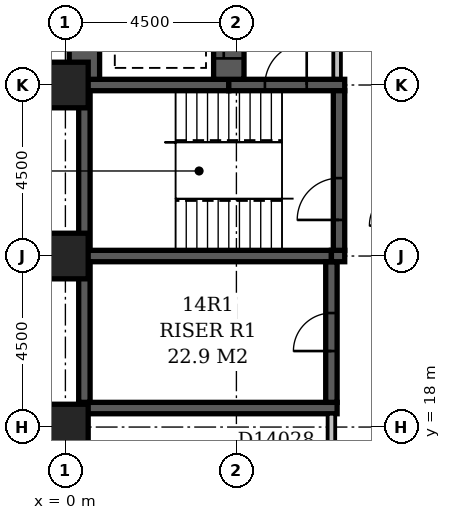
"""IFC4 building model, lengths in metres.
Left out: names, types, materials, properties, quantities, classifications, styles, units other than length and angle.
Written with IfcOpenShell. Run it as: python <this file> out.ifc"""

import sys

from ifc_helpers import new_model, si_unit, direction, frame, frame_2d, origin, origin_2d, place, context, subcontext, project, spatial, rectangle, extrude, element, fill, save


model = new_model("IFC4")
c1 = context("Model", 3, precision=1e-05, world=origin(), true_north=direction((0.0, 1.0)))
c2 = subcontext(c1, "Body", "Model", "MODEL_VIEW")
j1 = project(units=[si_unit("LENGTHUNIT", "METRE"), si_unit("PLANEANGLEUNIT", "RADIAN")], contexts=[c1])
p1 = place(None, origin())
s1 = spatial("IfcSite", under=j1, at=p1, CompositionType="ELEMENT")
p2 = place(p1, origin())
s2 = spatial("IfcBuilding", under=s1, at=p2, CompositionType="ELEMENT")
p3 = place(p2, frame((0.0, 0.0, 61.4)))
s3 = spatial("IfcBuildingStorey", under=s2, at=p3, CompositionType="ELEMENT", Elevation=61.4)
p4 = place(p3, frame((0.35, 18.5, -0.3), z_axis=(0.0, 0.0, 1.0), x_axis=(1.0, 0.0, 0.0)))
e1 = element("IfcWall", 1, at=p4, inside=s3, PredefinedType="SHEAR", context=c2, shape_type="SweptSolid", body=[
    extrude(rectangle(XDim=6.8, YDim=0.3, at=frame_2d((3.4, 0.0))), origin(), (0.0, 0.0, 1.0), 3.6),
])
p5 = place(p3, frame((0.35, 22.5, -0.3), z_axis=(0.0, 0.0, 1.0), x_axis=(1.0, 0.0, 0.0)))
e2 = element("IfcWall", 2, at=p5, inside=s3, PredefinedType="SHEAR", context=c2, shape_type="SweptSolid", body=[
    extrude(rectangle(XDim=6.65, YDim=0.3, at=frame_2d((3.325, 0.0))), origin(), (0.0, 0.0, 1.0), 3.6),
])
p6 = place(p3, frame((0.35, 27.0, -0.3), z_axis=(0.0, 0.0, 1.0), x_axis=(1.0, 0.0, 0.0)))
e3 = element("IfcWall", 3, at=p6, inside=s3, PredefinedType="SHEAR", context=c2, shape_type="SweptSolid", body=[
    extrude(rectangle(XDim=3.95, YDim=0.3, at=frame_2d((1.975, 0.0))), origin(), (0.0, 0.0, 1.0), 3.6),
])
p7 = place(p3, frame((0.5, 18.65, -0.3), z_axis=(0.0, 0.0, 1.0), x_axis=(0.0, 1.0, 0.0)))
e4 = element("IfcWall", 4, at=p7, inside=s3, PredefinedType="SHEAR", context=c2, shape_type="SweptSolid", body=[
    extrude(rectangle(XDim=3.7, YDim=0.3, at=frame_2d((1.85, 0.0))), origin(), (0.0, 0.0, 1.0), 3.6),
])
p8 = place(p3, frame((0.5, 22.65, -0.3), z_axis=(0.0, 0.0, 1.0), x_axis=(0.0, 1.0, 0.0)))
e5 = element("IfcWall", 5, at=p8, inside=s3, PredefinedType="SHEAR", context=c2, shape_type="SweptSolid", body=[
    extrude(rectangle(XDim=4.2, YDim=0.3, at=frame_2d((2.1, 0.0))), origin(), (0.0, 0.0, 1.0), 3.6),
])
p9 = place(p3, frame((0.5, 27.15, -0.3), z_axis=(0.0, 0.0, 1.0), x_axis=(0.0, 1.0, 0.0)))
e6 = element("IfcWall", 6, at=p9, inside=s3, PredefinedType="SHEAR", context=c2, shape_type="SweptSolid", body=[
    extrude(rectangle(XDim=6.95, YDim=0.8, at=frame_2d((3.475, 0.0))), origin(), (0.0, 0.0, 1.0), 3.6),
])
p10 = place(p3, frame((4.3, 27.0, -0.3), z_axis=(0.0, 0.0, 1.0), x_axis=(1.0, 0.0, 0.0)))
e7 = element("IfcWall", 7, at=p10, inside=s3, PredefinedType="SHEAR", context=c2, shape_type="SweptSolid", body=[
    extrude(rectangle(XDim=3.05, YDim=0.3, at=frame_2d((1.525, 0.0))), origin(), (0.0, 0.0, 1.0), 3.6),
])
p11 = place(p10, frame((0.95, 0.0, 0.3)))
e8 = element("IfcOpeningElement", 8, at=p11, cuts=e7, PredefinedType="OPENING", context=c2, shape_type="SweptSolid", body=[
    extrude(rectangle(XDim=1.1, YDim=2.1, at=frame_2d((0.55, 1.05))), frame((0.0, 0.162, 0.0), z_axis=(0.0, -1.0, 0.0), x_axis=(1.0, 0.0, 0.0)), (0.0, 0.0, 1.0), 0.324),
])
p12 = place(p3, frame((4.3, 27.15, -0.3), z_axis=(0.0, 0.0, 1.0), x_axis=(0.0, 1.0, 0.0)))
e9 = element("IfcWall", 9, at=p12, inside=s3, PredefinedType="SHEAR", context=c2, shape_type="SweptSolid", body=[
    extrude(rectangle(XDim=6.95, YDim=0.8, at=frame_2d((3.475, 0.0))), origin(), (0.0, 0.0, 1.0), 3.6),
])
p13 = place(p12, frame((3.05, 0.0, 0.3)))
e10 = element("IfcOpeningElement", 10, at=p13, cuts=e9, PredefinedType="OPENING", context=c2, shape_type="SweptSolid", body=[
    extrude(rectangle(XDim=1.1, YDim=2.1, at=frame_2d((0.55, 1.05))), frame((0.0, 0.412, 0.0), z_axis=(0.0, -1.0, 0.0), x_axis=(1.0, 0.0, 0.0)), (0.0, 0.0, 1.0), 0.824),
])
p14 = place(p12, frame((0.55, 0.0, 0.3)))
e11 = element("IfcOpeningElement", 11, at=p14, cuts=e9, PredefinedType="OPENING", context=c2, shape_type="SweptSolid", body=[
    extrude(rectangle(XDim=1.1, YDim=2.1, at=frame_2d((0.55, 1.05))), frame((0.0, 0.412, 0.0), z_axis=(0.0, -1.0, 0.0), x_axis=(1.0, 0.0, 0.0)), (0.0, 0.0, 1.0), 0.824),
])
p15 = place(p12, frame((5.35, 0.0, 0.3)))
e12 = element("IfcOpeningElement", 12, at=p15, cuts=e9, PredefinedType="OPENING", context=c2, shape_type="SweptSolid", body=[
    extrude(rectangle(XDim=1.1, YDim=2.1, at=frame_2d((0.55, 1.05))), frame((0.0, 0.412, 0.0), z_axis=(0.0, -1.0, 0.0), x_axis=(1.0, 0.0, 0.0)), (0.0, 0.0, 1.0), 0.824),
])
p16 = place(p3, frame((7.0, 18.65, -0.3), z_axis=(0.0, 0.0, 1.0), x_axis=(0.0, 1.0, 0.0)))
e13 = element("IfcWall", 13, at=p16, inside=s3, PredefinedType="SHEAR", context=c2, shape_type="SweptSolid", body=[
    extrude(rectangle(XDim=3.7, YDim=0.3, at=frame_2d((1.85, 0.0))), origin(), (0.0, 0.0, 1.0), 3.6),
])
p17 = place(p16, frame((1.35, 0.0, 0.3)))
e14 = element("IfcOpeningElement", 14, at=p17, cuts=e13, PredefinedType="OPENING", context=c2, shape_type="SweptSolid", body=[
    extrude(rectangle(XDim=1.0, YDim=2.1, at=frame_2d((0.5, 1.05))), frame((0.0, 0.162, 0.0), z_axis=(0.0, -1.0, 0.0), x_axis=(1.0, 0.0, 0.0)), (0.0, 0.0, 1.0), 0.324),
])
p18 = place(p3, frame((7.0, 22.5, -0.3), z_axis=(0.0, 0.0, 1.0), x_axis=(1.0, 0.0, 0.0)))
e15 = element("IfcWall", 15, at=p18, inside=s3, PredefinedType="SHEAR", context=c2, shape_type="SweptSolid", body=[
    extrude(rectangle(XDim=0.35, YDim=0.3, at=frame_2d((0.175, 0.0))), origin(), (0.0, 0.0, 1.0), 3.6),
])
p19 = place(p3, frame((7.2, 22.65, -0.3), z_axis=(0.0, 0.0, 1.0), x_axis=(0.0, 1.0, 0.0)))
e16 = element("IfcWall", 16, at=p19, inside=s3, PredefinedType="SHEAR", context=c2, shape_type="SweptSolid", body=[
    extrude(rectangle(XDim=4.2, YDim=0.3, at=frame_2d((2.1, 0.0))), origin(), (0.0, 0.0, 1.0), 3.6),
])
p20 = place(p19, frame((0.8, 0.0, 0.3)))
e17 = element("IfcOpeningElement", 17, at=p20, cuts=e16, PredefinedType="OPENING", context=c2, shape_type="SweptSolid", body=[
    extrude(rectangle(XDim=1.1, YDim=2.1, at=frame_2d((0.55, 1.05))), frame((0.0, 0.162, 0.0), z_axis=(0.0, -1.0, 0.0), x_axis=(1.0, 0.0, 0.0)), (0.0, 0.0, 1.0), 0.324),
])
for number, where, z_axis, x_axis in (
    (18, (0.0, 18.0, -0.3), (0.0, 0.0, 1.0), (1.0, 0.0, 0.0)),
    (19, (0.0, 22.5, -0.3), (0.0, 0.0, 1.0), (1.0, 0.0, 0.0)),
    (20, (0.0, 27.0, -0.3), (0.0, 0.0, 1.0), (1.0, 0.0, 0.0)),
):
    element("IfcColumn", number, at=place(p3, frame(where, z_axis=z_axis, x_axis=x_axis)), inside=s3, PredefinedType="COLUMN", context=c2, shape_type="SweptSolid", body=[
        extrude(rectangle(XDim=1.2, YDim=1.2, at=origin_2d()), origin(), (0.0, 0.0, 1.0), 3.6),
    ])
p21 = place(p3, frame((7.15, 27.17, 0.0), z_axis=(0.0, 0.0, 1.0), x_axis=(0.0, 1.0, 0.0)))
e21 = element("IfcWall", 21, at=p21, inside=s3, PredefinedType="PARTITIONING", context=c2, shape_type="SweptSolid", body=[
    extrude(rectangle(XDim=4.83, YDim=0.2, at=frame_2d((2.415, 0.0))), origin(), (0.0, 0.0, 1.0), 3.3),
])
p22 = place(p21, frame((1.73, 0.0, 0.0)))
e22 = element("IfcOpeningElement", 22, at=p22, cuts=e21, PredefinedType="OPENING", context=c2, shape_type="SweptSolid", body=[
    extrude(rectangle(XDim=1.2, YDim=2.1, at=frame_2d((0.6, 1.05))), frame((0.0, 0.112, 0.0), z_axis=(0.0, -1.0, 0.0), x_axis=(1.0, 0.0, 0.0)), (0.0, 0.0, 1.0), 0.224),
])
p23 = place(p3, frame((7.0, 14.15, 0.0), z_axis=(0.0, 0.0, 1.0), x_axis=(0.0, 1.0, 0.0)))
e23 = element("IfcWall", 23, at=p23, inside=s3, PredefinedType="PARTITIONING", context=c2, shape_type="SweptSolid", body=[
    extrude(rectangle(XDim=4.2, YDim=0.2, at=frame_2d((2.1, 0.0))), origin(), (0.0, 0.0, 1.0), 3.3),
])
p24 = place(p23, frame((1.6, 0.0, 0.0)))
e24 = element("IfcOpeningElement", 24, at=p24, cuts=e23, PredefinedType="OPENING", context=c2, shape_type="SweptSolid", body=[
    extrude(rectangle(XDim=1.0, YDim=2.1, at=frame_2d((0.5, 1.05))), frame((0.0, 0.112, 0.0), z_axis=(0.0, -1.0, 0.0), x_axis=(1.0, 0.0, 0.0)), (0.0, 0.0, 1.0), 0.224),
])
p25 = place(p14, origin())
e25 = element("IfcDoor", 25, at=p25, inside=s3, OperationType="SLIDING_TO_LEFT", PredefinedType="DOOR", context=c2, shape_type="SweptSolid", body=[
    extrude(rectangle(XDim=1.1, YDim=2.1, at=frame_2d((0.55, 1.05))), frame((0.0, 0.025, 0.0), z_axis=(0.0, -1.0, 0.0), x_axis=(1.0, 0.0, 0.0)), (0.0, 0.0, 1.0), 0.05),
])
fill(e11, e25)
p26 = place(p17, origin())
e26 = element("IfcDoor", 26, at=p26, inside=s3, OperationType="SINGLE_SWING_LEFT", PredefinedType="DOOR", context=c2, shape_type="SweptSolid", body=[
    extrude(rectangle(XDim=1.0, YDim=2.1, at=frame_2d((0.5, 1.05))), frame((0.0, 0.025, 0.0), z_axis=(0.0, -1.0, 0.0), x_axis=(1.0, 0.0, 0.0)), (0.0, 0.0, 1.0), 0.05),
])
fill(e14, e26)
p27 = place(p11, frame((1.1, 0.0, 0.0), z_axis=(0.0, 0.0, 1.0), x_axis=(-1.0, 0.0, 0.0)))
e27 = element("IfcDoor", 27, at=p27, inside=s3, OperationType="SINGLE_SWING_LEFT", PredefinedType="DOOR", context=c2, shape_type="SweptSolid", body=[
    extrude(rectangle(XDim=1.1, YDim=2.1, at=frame_2d((0.55, 1.05))), frame((0.0, 0.025, 0.0), z_axis=(0.0, -1.0, 0.0), x_axis=(1.0, 0.0, 0.0)), (0.0, 0.0, 1.0), 0.05),
])
fill(e8, e27)
p28 = place(p20, origin())
e28 = element("IfcDoor", 28, at=p28, inside=s3, OperationType="SINGLE_SWING_LEFT", PredefinedType="DOOR", context=c2, shape_type="SweptSolid", body=[
    extrude(rectangle(XDim=1.1, YDim=2.1, at=frame_2d((0.55, 1.05))), frame((0.0, 0.025, 0.0), z_axis=(0.0, -1.0, 0.0), x_axis=(1.0, 0.0, 0.0)), (0.0, 0.0, 1.0), 0.05),
])
fill(e17, e28)
save(model, sys.argv[1])
